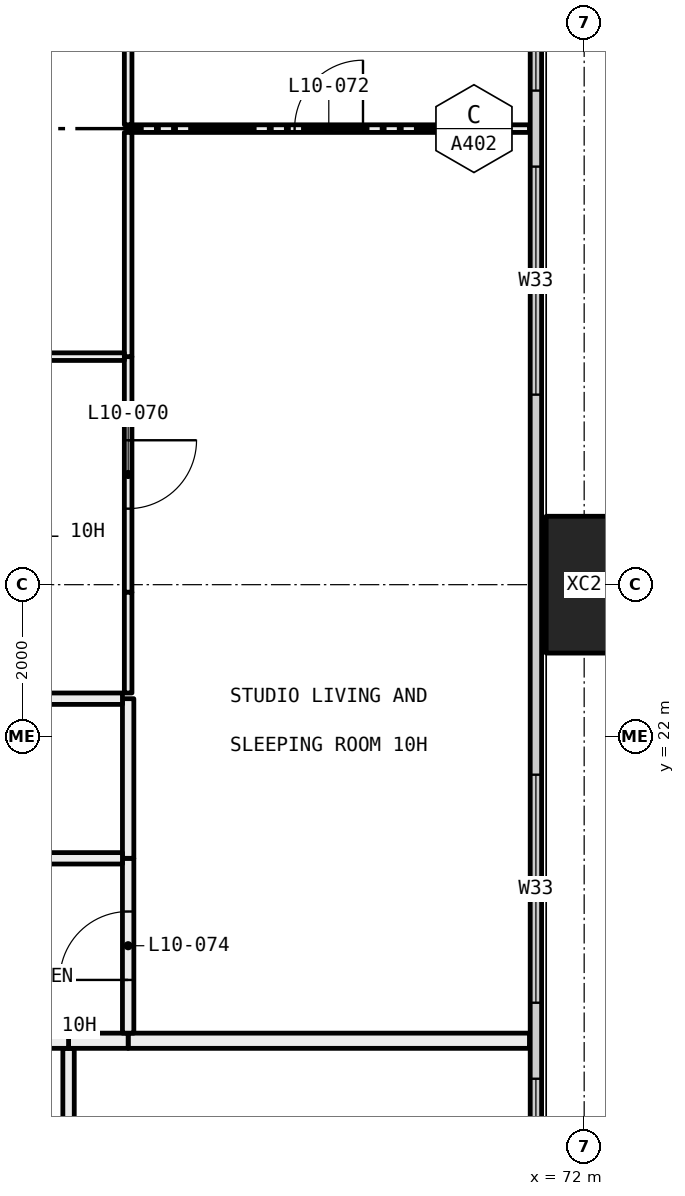
"""IFC4 building model, lengths in metres.
Left out: names, types, materials, properties, quantities, classifications, styles, units other than length and angle.
Written with IfcOpenShell. Run it as: python <this file> out.ifc"""

import sys

from ifc_helpers import new_model, si_unit, direction, frame, frame_2d, origin, origin_2d, place, context, subcontext, project, spatial, rectangle, hollow_rectangle, extrude, element, fill, save


model = new_model("IFC4")
c1 = context("Model", 3, precision=1e-05, world=origin(), true_north=direction((0.0, 1.0)))
c2 = subcontext(c1, "Body", "Model", "MODEL_VIEW")
j1 = project(units=[si_unit("LENGTHUNIT", "METRE"), si_unit("PLANEANGLEUNIT", "RADIAN")], contexts=[c1])
p1 = place(None, origin())
s1 = spatial("IfcSite", under=j1, at=p1, CompositionType="ELEMENT")
p2 = place(p1, origin())
s2 = spatial("IfcBuilding", under=s1, at=p2, CompositionType="ELEMENT")
p3 = place(p2, frame((0.0, 0.0, 47.25)))
s3 = spatial("IfcBuildingStorey", under=s2, at=p3, CompositionType="ELEMENT", Elevation=47.25)
p4 = place(p3, frame((72.0, 24.0, -0.4), z_axis=(0.0, 0.0, 1.0), x_axis=(0.0, 1.0, 0.0)))
e1 = element("IfcColumn", 1, at=p4, inside=s3, PredefinedType="COLUMN", context=c2, shape_type="SweptSolid", body=[
    extrude(hollow_rectangle(XDim=1.8, YDim=1.0, WallThickness=0.07, at=origin_2d()), origin(), (0.0, 0.0, 1.0), 3.45),
])
p5 = place(p3, frame((71.365, 6.71, 0.0), z_axis=(0.0, 0.0, 1.0), x_axis=(0.0, 1.0, 0.0)))
e2 = element("IfcWall", 2, at=p5, inside=s3, PredefinedType="ELEMENTEDWALL", context=c2, shape_type="SweptSolid", body=[
    extrude(rectangle(XDim=34.58, YDim=0.15, at=frame_2d((17.29, 0.0))), origin(), (0.0, 0.0, 1.0), 3.05),
])
p6 = place(p5, frame((0.29, 0.0, 0.45)))
e3 = element("IfcOpeningElement", 3, at=p6, cuts=e2, PredefinedType="OPENING", context=c2, shape_type="SweptSolid", body=[
    extrude(rectangle(XDim=4.5, YDim=2.55, at=frame_2d((2.25, 1.275))), frame((0.0, 0.085, 0.0), z_axis=(0.0, -1.0, 0.0), x_axis=(1.0, 0.0, 0.0)), (0.0, 0.0, 1.0), 0.17),
])
p7 = place(p5, frame((7.79, 0.0, 0.45)))
e4 = element("IfcOpeningElement", 4, at=p7, cuts=e2, PredefinedType="OPENING", context=c2, shape_type="SweptSolid", body=[
    extrude(rectangle(XDim=3.0, YDim=2.55, at=frame_2d((1.5, 1.275))), frame((0.0, 0.085, 0.0), z_axis=(0.0, -1.0, 0.0), x_axis=(1.0, 0.0, 0.0)), (0.0, 0.0, 1.0), 0.17),
])
p8 = place(p5, frame((11.79, 0.0, 0.45)))
e5 = element("IfcOpeningElement", 5, at=p8, cuts=e2, PredefinedType="OPENING", context=c2, shape_type="SweptSolid", body=[
    extrude(rectangle(XDim=3.0, YDim=2.55, at=frame_2d((1.5, 1.275))), frame((0.0, 0.085, 0.0), z_axis=(0.0, -1.0, 0.0), x_axis=(1.0, 0.0, 0.0)), (0.0, 0.0, 1.0), 0.17),
])
p9 = place(p5, frame((19.79, 0.0, 0.45)))
e6 = element("IfcOpeningElement", 6, at=p9, cuts=e2, PredefinedType="OPENING", context=c2, shape_type="SweptSolid", body=[
    extrude(rectangle(XDim=3.0, YDim=2.55, at=frame_2d((1.5, 1.275))), frame((0.0, 0.085, 0.0), z_axis=(0.0, -1.0, 0.0), x_axis=(1.0, 0.0, 0.0)), (0.0, 0.0, 1.0), 0.17),
])
p10 = place(p5, frame((23.79, 0.0, 0.45)))
e7 = element("IfcOpeningElement", 7, at=p10, cuts=e2, PredefinedType="OPENING", context=c2, shape_type="SweptSolid", body=[
    extrude(rectangle(XDim=2.0, YDim=2.55, at=frame_2d((1.0, 1.275))), frame((0.0, 0.085, 0.0), z_axis=(0.0, -1.0, 0.0), x_axis=(1.0, 0.0, 0.0)), (0.0, 0.0, 1.0), 0.17),
])
p11 = place(p5, frame((29.79, 0.0, 0.45)))
e8 = element("IfcOpeningElement", 8, at=p11, cuts=e2, PredefinedType="OPENING", context=c2, shape_type="SweptSolid", body=[
    extrude(rectangle(XDim=4.5, YDim=2.55, at=frame_2d((2.25, 1.275))), frame((0.0, 0.085, 0.0), z_axis=(0.0, -1.0, 0.0), x_axis=(1.0, 0.0, 0.0)), (0.0, 0.0, 1.0), 0.17),
])
p12 = place(p3, frame((65.216, 17.9, 0.0), z_axis=(0.0, 0.0, 1.0), x_axis=(0.0, -1.0, 0.0)))
e9 = element("IfcWall", 9, at=p12, inside=s3, PredefinedType="PARTITIONING", context=c2, shape_type="SweptSolid", body=[
    extrude(rectangle(XDim=2.671, YDim=0.15, at=frame_2d((1.335, 0.0))), origin(), (0.0, 0.0, 1.0), 3.05),
])
p13 = place(p3, frame((71.28, 18.0, 0.0), z_axis=(0.0, 0.0, 1.0), x_axis=(-1.0, 0.0, 0.0)))
e10 = element("IfcWall", 10, at=p13, inside=s3, PredefinedType="PARTITIONING", context=c2, shape_type="SweptSolid", body=[
    extrude(rectangle(XDim=5.28, YDim=0.2, at=frame_2d((2.64, 0.0))), origin(), (0.0, 0.0, 1.0), 3.05),
])
p14 = place(p3, frame((66.0, 18.0, 0.0), z_axis=(0.0, 0.0, 1.0), x_axis=(-1.0, 0.0, 0.0)))
e11 = element("IfcWall", 11, at=p14, inside=s3, PredefinedType="PARTITIONING", context=c2, shape_type="SweptSolid", body=[
    extrude(rectangle(XDim=0.784, YDim=0.2, at=frame_2d((0.392, 0.0))), origin(), (0.0, 0.0, 1.0), 3.05),
])
p15 = place(p3, frame((65.216, 18.0, 0.0), z_axis=(0.0, 0.0, 1.0), x_axis=(-1.0, 0.0, 0.0)))
e12 = element("IfcWall", 12, at=p15, inside=s3, PredefinedType="PARTITIONING", context=c2, shape_type="SweptSolid", body=[
    extrude(rectangle(XDim=1.066, YDim=0.2, at=frame_2d((0.533, 0.0))), origin(), (0.0, 0.0, 1.0), 3.05),
])
p16 = place(p3, frame((71.28, 30.0, 0.0), z_axis=(0.0, 0.0, 1.0), x_axis=(-1.0, 0.0, 0.0)))
e13 = element("IfcWall", 13, at=p16, inside=s3, PredefinedType="PARTITIONING", context=c2, shape_type="SweptSolid", body=[
    extrude(rectangle(XDim=5.28, YDim=0.1, at=frame_2d((2.64, 0.0))), origin(), (0.0, 0.0, 1.0), 3.05),
])
p17 = place(p16, frame((2.19, 0.0, 0.0)))
e14 = element("IfcOpeningElement", 14, at=p17, cuts=e13, PredefinedType="OPENING", context=c2, shape_type="SweptSolid", body=[
    extrude(rectangle(XDim=0.9, YDim=2.1, at=frame_2d((0.45, 1.05))), frame((0.0, 0.06, 0.0), z_axis=(0.0, -1.0, 0.0), x_axis=(1.0, 0.0, 0.0)), (0.0, 0.0, 1.0), 0.12),
])
p18 = place(p3, frame((66.0, 20.4, 0.0), z_axis=(0.0, 0.0, 1.0), x_axis=(0.0, -1.0, 0.0)))
e15 = element("IfcWall", 15, at=p18, inside=s3, PredefinedType="PARTITIONING", context=c2, shape_type="SweptSolid", body=[
    extrude(rectangle(XDim=2.3, YDim=0.15, at=frame_2d((1.15, 0.0))), origin(), (0.0, 0.0, 1.0), 3.05),
])
p19 = place(p18, frame((0.7, 0.0, 0.0)))
e16 = element("IfcOpeningElement", 16, at=p19, cuts=e15, PredefinedType="OPENING", context=c2, shape_type="SweptSolid", body=[
    extrude(rectangle(XDim=0.9, YDim=2.1, at=frame_2d((0.45, 1.05))), frame((0.0, 0.085, 0.0), z_axis=(0.0, -1.0, 0.0), x_axis=(1.0, 0.0, 0.0)), (0.0, 0.0, 1.0), 0.17),
])
p20 = place(p3, frame((66.0, 22.5, 0.0), z_axis=(0.0, 0.0, 1.0), x_axis=(0.0, -1.0, 0.0)))
e17 = element("IfcWall", 17, at=p20, inside=s3, PredefinedType="PARTITIONING", context=c2, shape_type="SweptSolid", body=[
    extrude(rectangle(XDim=2.1, YDim=0.15, at=frame_2d((1.05, 0.0))), origin(), (0.0, 0.0, 1.0), 3.05),
])
p21 = place(p3, frame((66.0, 27.0, 0.0), z_axis=(0.0, 0.0, 1.0), x_axis=(0.0, -1.0, 0.0)))
e18 = element("IfcWall", 18, at=p21, inside=s3, PredefinedType="PARTITIONING", context=c2, shape_type="SweptSolid", body=[
    extrude(rectangle(XDim=3.1, YDim=0.1, at=frame_2d((1.55, 0.0))), origin(), (0.0, 0.0, 1.0), 2.45),
])
p22 = place(p21, frame((1.1, 0.0, 0.0)))
e19 = element("IfcOpeningElement", 19, at=p22, cuts=e18, PredefinedType="OPENING", context=c2, shape_type="SweptSolid", body=[
    extrude(rectangle(XDim=0.9, YDim=2.1, at=frame_2d((0.45, 1.05))), frame((0.0, 0.06, 0.0), z_axis=(0.0, -1.0, 0.0), x_axis=(1.0, 0.0, 0.0)), (0.0, 0.0, 1.0), 0.12),
])
p23 = place(p3, frame((66.0, 23.9, 0.0), z_axis=(0.0, 0.0, 1.0), x_axis=(0.0, -1.0, 0.0)))
e20 = element("IfcWall", 20, at=p23, inside=s3, PredefinedType="PARTITIONING", context=c2, shape_type="SweptSolid", body=[
    extrude(rectangle(XDim=1.325, YDim=0.1, at=frame_2d((0.663, 0.0))), origin(), (0.0, 0.0, 1.0), 3.05),
])
p24 = place(p3, frame((66.0, 29.95, 0.0), z_axis=(0.0, 0.0, 1.0), x_axis=(0.0, -1.0, 0.0)))
e21 = element("IfcWall", 21, at=p24, inside=s3, PredefinedType="PARTITIONING", context=c2, shape_type="SweptSolid", body=[
    extrude(rectangle(XDim=2.95, YDim=0.1, at=frame_2d((1.475, 0.0))), origin(), (0.0, 0.0, 1.0), 3.05),
])
p25 = place(p3, frame((66.0, 35.95, 0.0), z_axis=(0.0, 0.0, 1.0), x_axis=(0.0, -1.0, 0.0)))
e22 = element("IfcWall", 22, at=p25, inside=s3, PredefinedType="PARTITIONING", context=c2, shape_type="SweptSolid", body=[
    extrude(rectangle(XDim=5.9, YDim=0.1, at=frame_2d((2.95, 0.0))), origin(), (0.0, 0.0, 1.0), 2.45),
])
p26 = place(p3, frame((65.925, 20.4, 0.0), z_axis=(0.0, 0.0, 1.0), x_axis=(-1.0, 0.0, 0.0)))
e23 = element("IfcWall", 23, at=p26, inside=s3, PredefinedType="PARTITIONING", context=c2, shape_type="SweptSolid", body=[
    extrude(rectangle(XDim=1.7, YDim=0.15, at=frame_2d((0.85, 0.0))), origin(), (0.0, 0.0, 1.0), 3.05),
])
p27 = place(p3, frame((65.925, 22.5, 0.0), z_axis=(0.0, 0.0, 1.0), x_axis=(-1.0, 0.0, 0.0)))
e24 = element("IfcWall", 24, at=p27, inside=s3, PredefinedType="PARTITIONING", context=c2, shape_type="SweptSolid", body=[
    extrude(rectangle(XDim=3.925, YDim=0.15, at=frame_2d((1.962, 0.0))), origin(), (0.0, 0.0, 1.0), 3.05),
])
p28 = place(p27, frame((1.512, 0.0, 0.0)))
e25 = element("IfcOpeningElement", 25, at=p28, cuts=e24, PredefinedType="OPENING", context=c2, shape_type="SweptSolid", body=[
    extrude(rectangle(XDim=0.9, YDim=2.1, at=frame_2d((0.45, 1.05))), frame((0.0, 0.085, 0.0), z_axis=(0.0, -1.0, 0.0), x_axis=(1.0, 0.0, 0.0)), (0.0, 0.0, 1.0), 0.17),
])
p29 = place(p3, frame((65.95, 27.0, 0.0), z_axis=(0.0, 0.0, 1.0), x_axis=(-1.0, 0.0, 0.0)))
e26 = element("IfcWall", 26, at=p29, inside=s3, PredefinedType="PARTITIONING", context=c2, shape_type="SweptSolid", body=[
    extrude(rectangle(XDim=3.95, YDim=0.1, at=frame_2d((1.975, 0.0))), origin(), (0.0, 0.0, 1.0), 3.05),
])
p30 = place(p29, frame((1.525, 0.0, 0.0)))
e27 = element("IfcOpeningElement", 27, at=p30, cuts=e26, PredefinedType="OPENING", context=c2, shape_type="SweptSolid", body=[
    extrude(rectangle(XDim=0.9, YDim=2.1, at=frame_2d((0.45, 1.05))), frame((0.0, 0.06, 0.0), z_axis=(0.0, -1.0, 0.0), x_axis=(1.0, 0.0, 0.0)), (0.0, 0.0, 1.0), 0.12),
])
p31 = place(p7, origin())
e28 = element("IfcWindow", 28, at=p31, inside=s3, PartitioningType="SINGLE_PANEL", PredefinedType="WINDOW", context=c2, shape_type="SweptSolid", body=[
    extrude(rectangle(XDim=3.0, YDim=2.55, at=frame_2d((1.5, 1.275))), frame((0.0, 0.03, 0.0), z_axis=(0.0, -1.0, 0.0), x_axis=(1.0, 0.0, 0.0)), (0.0, 0.0, 1.0), 0.06),
])
fill(e4, e28)
p32 = place(p8, origin())
e29 = element("IfcWindow", 29, at=p32, inside=s3, PartitioningType="SINGLE_PANEL", PredefinedType="WINDOW", context=c2, shape_type="SweptSolid", body=[
    extrude(rectangle(XDim=3.0, YDim=2.55, at=frame_2d((1.5, 1.275))), frame((0.0, 0.03, 0.0), z_axis=(0.0, -1.0, 0.0), x_axis=(1.0, 0.0, 0.0)), (0.0, 0.0, 1.0), 0.06),
])
fill(e5, e29)
p33 = place(p9, origin())
e30 = element("IfcWindow", 30, at=p33, inside=s3, PartitioningType="SINGLE_PANEL", PredefinedType="WINDOW", context=c2, shape_type="SweptSolid", body=[
    extrude(rectangle(XDim=3.0, YDim=2.55, at=frame_2d((1.5, 1.275))), frame((0.0, 0.03, 0.0), z_axis=(0.0, -1.0, 0.0), x_axis=(1.0, 0.0, 0.0)), (0.0, 0.0, 1.0), 0.06),
])
fill(e6, e30)
p34 = place(p10, origin())
e31 = element("IfcWindow", 31, at=p34, inside=s3, PartitioningType="SINGLE_PANEL", PredefinedType="WINDOW", context=c2, shape_type="SweptSolid", body=[
    extrude(rectangle(XDim=2.0, YDim=2.55, at=frame_2d((1.0, 1.275))), frame((0.0, 0.03, 0.0), z_axis=(0.0, -1.0, 0.0), x_axis=(1.0, 0.0, 0.0)), (0.0, 0.0, 1.0), 0.06),
])
fill(e7, e31)
p35 = place(p22, origin())
e32 = element("IfcDoor", 32, at=p35, inside=s3, OperationType="SINGLE_SWING_RIGHT", PredefinedType="DOOR", context=c2, shape_type="SweptSolid", body=[
    extrude(rectangle(XDim=0.9, YDim=2.1, at=frame_2d((0.45, 1.05))), frame((0.0, 0.025, 0.0), z_axis=(0.0, -1.0, 0.0), x_axis=(1.0, 0.0, 0.0)), (0.0, 0.0, 1.0), 0.05),
])
fill(e19, e32)
p36 = place(p17, frame((0.9, 0.0, 0.0), x_axis=(-1.0, 0.0, 0.0)))
e33 = element("IfcDoor", 33, at=p36, inside=s3, OperationType="SINGLE_SWING_LEFT", PredefinedType="DOOR", context=c2, shape_type="SweptSolid", body=[
    extrude(rectangle(XDim=0.9, YDim=2.1, at=frame_2d((0.45, 1.05))), frame((0.0, 0.025, 0.0), z_axis=(0.0, -1.0, 0.0), x_axis=(1.0, 0.0, 0.0)), (0.0, 0.0, 1.0), 0.05),
])
fill(e14, e33)
p37 = place(p19, frame((0.9, 0.0, 0.0), x_axis=(-1.0, 0.0, 0.0)))
e34 = element("IfcDoor", 34, at=p37, inside=s3, OperationType="SINGLE_SWING_RIGHT", PredefinedType="DOOR", context=c2, shape_type="SweptSolid", body=[
    extrude(rectangle(XDim=0.9, YDim=2.1, at=frame_2d((0.45, 1.05))), frame((0.0, 0.025, 0.0), z_axis=(0.0, -1.0, 0.0), x_axis=(1.0, 0.0, 0.0)), (0.0, 0.0, 1.0), 0.05),
])
fill(e16, e34)
save(model, sys.argv[1])
